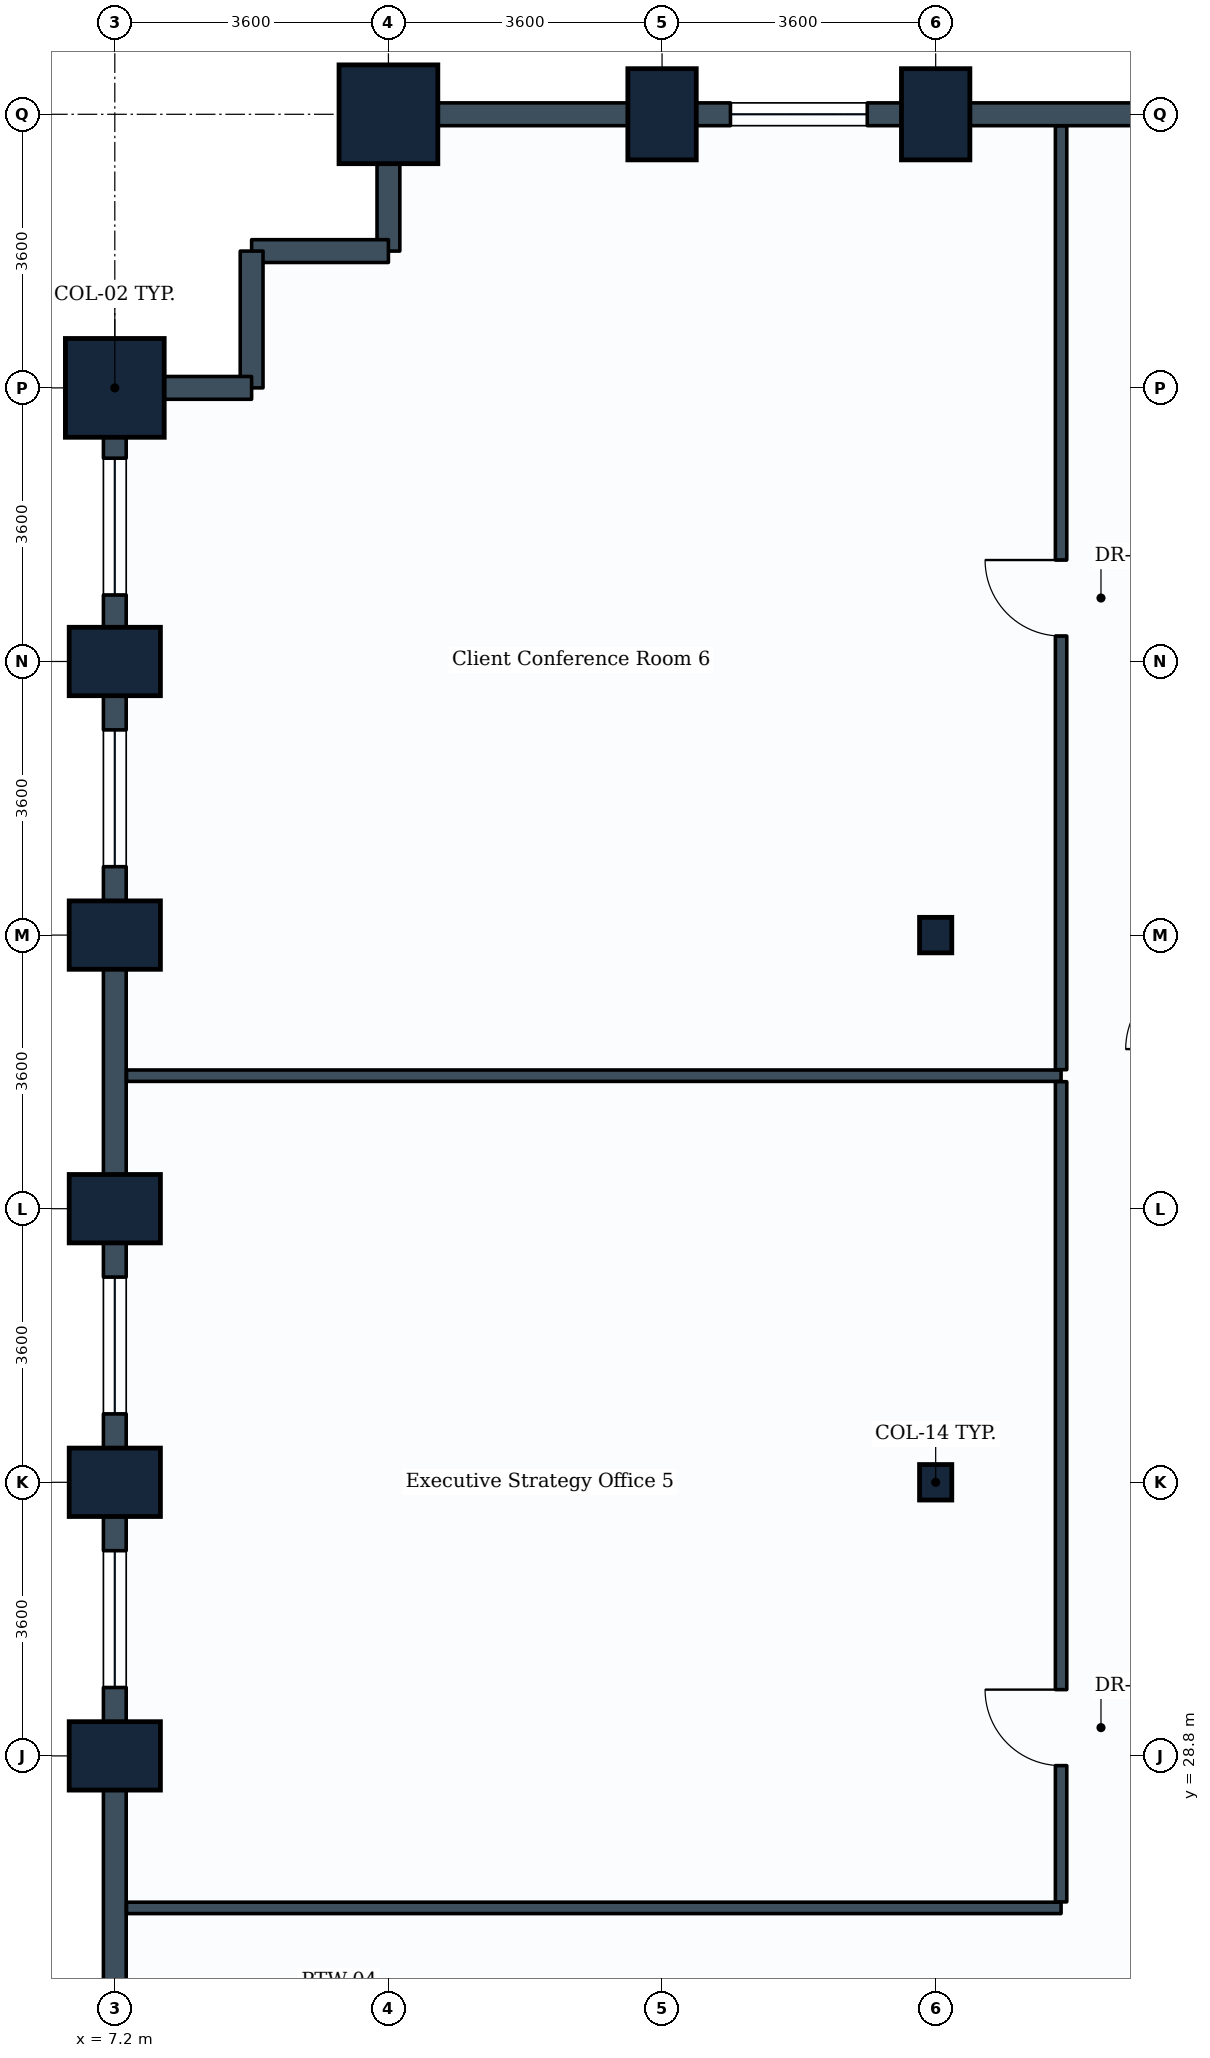
"""IFC4 building model, lengths in metres.
Left out: names, types, materials, properties, quantities, classifications, styles, units other than length and angle.
Written with IfcOpenShell. Run it as: python <this file> out.ifc"""

import sys

from ifc_helpers import new_model, si_unit, direction, frame, frame_2d, origin, origin_2d, place, context, subcontext, project, spatial, rectangle, i_section, extrude, element, fill, save


model = new_model("IFC4")
c1 = context("Model", 3, precision=1e-05, world=origin(), true_north=direction((0.0, 1.0)))
c2 = subcontext(c1, "Body", "Model", "MODEL_VIEW")
j1 = project(units=[si_unit("LENGTHUNIT", "METRE"), si_unit("PLANEANGLEUNIT", "RADIAN")], contexts=[c1])
p1 = place(None, origin())
s1 = spatial("IfcSite", under=j1, at=p1, CompositionType="ELEMENT")
p2 = place(p1, origin())
s2 = spatial("IfcBuilding", under=s1, at=p2, CompositionType="ELEMENT")
p3 = place(p2, frame((0.0, 0.0, 31.8)))
s3 = spatial("IfcBuildingStorey", under=s2, at=p3, CompositionType="ELEMENT", Elevation=31.8)
for number, where, z_axis, x_axis in (
    (1, (7.2, 28.8, 0.0), (0.0, 0.0, 1.0), (0.0, 1.0, 0.0)),
    (2, (7.2, 32.4, 0.0), (0.0, 0.0, 1.0), (0.0, 1.0, 0.0)),
    (3, (7.2, 36.0, 0.0), (0.0, 0.0, 1.0), (0.0, 1.0, 0.0)),
    (4, (7.2, 39.6, 0.0), (0.0, 0.0, 1.0), (0.0, 1.0, 0.0)),
    (5, (7.2, 43.2, 0.0), (0.0, 0.0, 1.0), (0.0, 1.0, 0.0)),
):
    element("IfcColumn", number, at=place(p3, frame(where, z_axis=z_axis, x_axis=x_axis)), inside=s3, PredefinedType="COLUMN", context=c2, shape_type="SweptSolid", body=[
        extrude(rectangle(XDim=0.9, YDim=1.2, at=origin_2d()), origin(), (0.0, 0.0, 1.0), 3.9),
    ])
for number, where, z_axis, x_axis in (
    (6, (7.2, 46.8, 0.0), (0.0, 0.0, 1.0), (0.0, 1.0, 0.0)),
    (7, (10.8, 50.4, 0.0), (0.0, 0.0, 1.0), (1.0, 0.0, 0.0)),
):
    element("IfcColumn", number, at=place(p3, frame(where, z_axis=z_axis, x_axis=x_axis)), inside=s3, PredefinedType="COLUMN", context=c2, shape_type="SweptSolid", body=[
        extrude(rectangle(XDim=1.3, YDim=1.3, at=origin_2d()), origin(), (0.0, 0.0, 1.0), 3.9),
    ])
p4 = place(p3, frame((14.4, 50.4, 0.0), z_axis=(0.0, 0.0, 1.0), x_axis=(1.0, 0.0, 0.0)))
e8 = element("IfcColumn", 8, at=p4, inside=s3, PredefinedType="COLUMN", context=c2, shape_type="SweptSolid", body=[
    extrude(rectangle(XDim=0.9, YDim=1.2, at=origin_2d()), origin(), (0.0, 0.0, 1.0), 3.9),
])
for number, where, z_axis, x_axis in (
    (9, (18.0, 32.4, 0.0), (0.0, 0.0, 1.0), (1.0, 0.0, 0.0)),
    (10, (18.0, 39.6, 0.0), (0.0, 0.0, 1.0), (1.0, 0.0, 0.0)),
):
    element("IfcColumn", number, at=place(p3, frame(where, z_axis=z_axis, x_axis=x_axis)), inside=s3, PredefinedType="COLUMN", context=c2, shape_type="SweptSolid", body=[
        extrude(i_section(OverallWidth=0.424, OverallDepth=0.467, WebThickness=0.033, FlangeThickness=0.053, FilletRadius=0.015, at=origin_2d()), origin(), (0.0, 0.0, 1.0), 3.9),
    ])
p5 = place(p3, frame((18.0, 50.4, 0.0), z_axis=(0.0, 0.0, 1.0), x_axis=(1.0, 0.0, 0.0)))
e11 = element("IfcColumn", 11, at=p5, inside=s3, PredefinedType="COLUMN", context=c2, shape_type="SweptSolid", body=[
    extrude(rectangle(XDim=0.9, YDim=1.2, at=origin_2d()), origin(), (0.0, 0.0, 1.0), 3.9),
])
p6 = place(p3, frame((18.0, 50.4, 0.0), z_axis=(0.0, 0.0, 1.0), x_axis=(1.0, 0.0, 0.0)))
e12 = element("IfcWall", 12, at=p6, inside=s3, PredefinedType="STANDARD", context=c2, shape_type="SweptSolid", body=[
    extrude(rectangle(XDim=3.6, YDim=0.3, at=frame_2d((1.8, 0.0))), origin(), (0.0, 0.0, 1.0), 2.93),
])
p7 = place(p3, frame((14.4, 50.4, 0.0), z_axis=(0.0, 0.0, 1.0), x_axis=(1.0, 0.0, 0.0)))
e13 = element("IfcWall", 13, at=p7, inside=s3, PredefinedType="STANDARD", context=c2, shape_type="SweptSolid", body=[
    extrude(rectangle(XDim=3.6, YDim=0.3, at=frame_2d((1.8, 0.0))), origin(), (0.0, 0.0, 1.0), 2.93),
])
p8 = place(p7, frame((0.9, 0.0, 0.85)))
e14 = element("IfcOpeningElement", 14, at=p8, cuts=e13, PredefinedType="OPENING", context=c2, shape_type="SweptSolid", body=[
    extrude(rectangle(XDim=1.8, YDim=1.35, at=frame_2d((0.9, 0.675))), frame((0.0, 0.16, 0.0), z_axis=(0.0, -1.0, 0.0), x_axis=(1.0, 0.0, 0.0)), (0.0, 0.0, 1.0), 0.32),
])
p9 = place(p3, frame((10.8, 50.4, 0.0), z_axis=(0.0, 0.0, 1.0), x_axis=(1.0, 0.0, 0.0)))
e15 = element("IfcWall", 15, at=p9, inside=s3, PredefinedType="STANDARD", context=c2, shape_type="SweptSolid", body=[
    extrude(rectangle(XDim=3.6, YDim=0.3, at=frame_2d((1.8, 0.0))), origin(), (0.0, 0.0, 1.0), 2.93),
])
p10 = place(p3, frame((10.8, 48.6, 0.0), z_axis=(0.0, 0.0, 1.0), x_axis=(0.0, 1.0, 0.0)))
e16 = element("IfcWall", 16, at=p10, inside=s3, PredefinedType="STANDARD", context=c2, shape_type="SweptSolid", body=[
    extrude(rectangle(XDim=1.8, YDim=0.3, at=frame_2d((0.9, 0.0))), origin(), (0.0, 0.0, 1.0), 2.93),
])
for number, where, z_axis, x_axis in (
    (17, (9.0, 48.6, 0.0), (0.0, 0.0, 1.0), (1.0, 0.0, 0.0)),
    (18, (9.0, 46.8, 0.0), (0.0, 0.0, 1.0), (0.0, 1.0, 0.0)),
):
    element("IfcWall", number, at=place(p3, frame(where, z_axis=z_axis, x_axis=x_axis)), inside=s3, PredefinedType="STANDARD", context=c2, shape_type="SweptSolid", body=[
        extrude(rectangle(XDim=1.8, YDim=0.3, at=frame_2d((0.9, 0.0))), origin(), (0.0, 0.0, 1.0), 3.635),
    ])
p11 = place(p3, frame((7.2, 46.8, 0.0), z_axis=(0.0, 0.0, 1.0), x_axis=(1.0, 0.0, 0.0)))
e19 = element("IfcWall", 19, at=p11, inside=s3, PredefinedType="STANDARD", context=c2, shape_type="SweptSolid", body=[
    extrude(rectangle(XDim=1.8, YDim=0.3, at=frame_2d((0.9, 0.0))), origin(), (0.0, 0.0, 1.0), 2.93),
])
p12 = place(p3, frame((7.2, 43.2, 0.0), z_axis=(0.0, 0.0, 1.0), x_axis=(0.0, 1.0, 0.0)))
e20 = element("IfcWall", 20, at=p12, inside=s3, PredefinedType="STANDARD", context=c2, shape_type="SweptSolid", body=[
    extrude(rectangle(XDim=3.6, YDim=0.3, at=frame_2d((1.8, 0.0))), origin(), (0.0, 0.0, 1.0), 2.93),
])
p13 = place(p12, frame((0.875, 0.0, 0.85)))
e21 = element("IfcOpeningElement", 21, at=p13, cuts=e20, PredefinedType="OPENING", context=c2, shape_type="SweptSolid", body=[
    extrude(rectangle(XDim=1.8, YDim=1.35, at=frame_2d((0.9, 0.675))), frame((0.0, 0.16, 0.0), z_axis=(0.0, -1.0, 0.0), x_axis=(1.0, 0.0, 0.0)), (0.0, 0.0, 1.0), 0.32),
])
p14 = place(p3, frame((7.2, 39.6, 0.0), z_axis=(0.0, 0.0, 1.0), x_axis=(0.0, 1.0, 0.0)))
e22 = element("IfcWall", 22, at=p14, inside=s3, PredefinedType="STANDARD", context=c2, shape_type="SweptSolid", body=[
    extrude(rectangle(XDim=3.6, YDim=0.3, at=frame_2d((1.8, 0.0))), origin(), (0.0, 0.0, 1.0), 2.93),
])
p15 = place(p14, frame((0.9, 0.0, 0.85)))
e23 = element("IfcOpeningElement", 23, at=p15, cuts=e22, PredefinedType="OPENING", context=c2, shape_type="SweptSolid", body=[
    extrude(rectangle(XDim=1.8, YDim=1.35, at=frame_2d((0.9, 0.675))), frame((0.0, 0.16, 0.0), z_axis=(0.0, -1.0, 0.0), x_axis=(1.0, 0.0, 0.0)), (0.0, 0.0, 1.0), 0.32),
])
p16 = place(p3, frame((7.2, 36.0, 0.0), z_axis=(0.0, 0.0, 1.0), x_axis=(0.0, 1.0, 0.0)))
e24 = element("IfcWall", 24, at=p16, inside=s3, PredefinedType="STANDARD", context=c2, shape_type="SweptSolid", body=[
    extrude(rectangle(XDim=3.6, YDim=0.3, at=frame_2d((1.8, 0.0))), origin(), (0.0, 0.0, 1.0), 2.93),
])
p17 = place(p3, frame((7.2, 32.4, 0.0), z_axis=(0.0, 0.0, 1.0), x_axis=(0.0, 1.0, 0.0)))
e25 = element("IfcWall", 25, at=p17, inside=s3, PredefinedType="STANDARD", context=c2, shape_type="SweptSolid", body=[
    extrude(rectangle(XDim=3.6, YDim=0.3, at=frame_2d((1.8, 0.0))), origin(), (0.0, 0.0, 1.0), 2.93),
])
p18 = place(p17, frame((0.9, 0.0, 0.85)))
e26 = element("IfcOpeningElement", 26, at=p18, cuts=e25, PredefinedType="OPENING", context=c2, shape_type="SweptSolid", body=[
    extrude(rectangle(XDim=1.8, YDim=1.35, at=frame_2d((0.9, 0.675))), frame((0.0, 0.16, 0.0), z_axis=(0.0, -1.0, 0.0), x_axis=(1.0, 0.0, 0.0)), (0.0, 0.0, 1.0), 0.32),
])
p19 = place(p3, frame((7.2, 28.8, 0.0), z_axis=(0.0, 0.0, 1.0), x_axis=(0.0, 1.0, 0.0)))
e27 = element("IfcWall", 27, at=p19, inside=s3, PredefinedType="STANDARD", context=c2, shape_type="SweptSolid", body=[
    extrude(rectangle(XDim=3.6, YDim=0.3, at=frame_2d((1.8, 0.0))), origin(), (0.0, 0.0, 1.0), 2.93),
])
p20 = place(p19, frame((0.9, 0.0, 0.85)))
e28 = element("IfcOpeningElement", 28, at=p20, cuts=e27, PredefinedType="OPENING", context=c2, shape_type="SweptSolid", body=[
    extrude(rectangle(XDim=1.8, YDim=1.35, at=frame_2d((0.9, 0.675))), frame((0.0, 0.16, 0.0), z_axis=(0.0, -1.0, 0.0), x_axis=(1.0, 0.0, 0.0)), (0.0, 0.0, 1.0), 0.32),
])
p21 = place(p3, frame((7.2, 25.2, 0.0), z_axis=(0.0, 0.0, 1.0), x_axis=(0.0, 1.0, 0.0)))
e29 = element("IfcWall", 29, at=p21, inside=s3, PredefinedType="STANDARD", context=c2, shape_type="SweptSolid", body=[
    extrude(rectangle(XDim=3.6, YDim=0.3, at=frame_2d((1.8, 0.0))), origin(), (0.0, 0.0, 1.0), 2.93),
])
for number, where, z_axis, x_axis in (
    (30, (7.354, 26.8, 0.0), (0.0, 0.0, 1.0), (1.0, 0.0, 0.0)),
    (31, (7.354, 37.75, 0.0), (0.0, 0.0, 1.0), (1.0, 0.0, 0.0)),
):
    element("IfcWall", number, at=place(p3, frame(where, z_axis=z_axis, x_axis=x_axis)), inside=s3, PredefinedType="PARTITIONING", context=c2, shape_type="SweptSolid", body=[
        extrude(rectangle(XDim=12.296, YDim=0.15, at=frame_2d((6.148, 0.0))), origin(), (0.0, 0.0, 1.0), 2.93),
    ])
p22 = place(p3, frame((19.65, 26.879, 0.0), z_axis=(0.0, 0.0, 1.0), x_axis=(0.0, 1.0, 0.0)))
e32 = element("IfcWall", 32, at=p22, inside=s3, PredefinedType="PARTITIONING", context=c2, shape_type="SweptSolid", body=[
    extrude(rectangle(XDim=10.792, YDim=0.15, at=frame_2d((5.396, 0.0))), origin(), (0.0, 0.0, 1.0), 3.08),
])
p23 = place(p22, frame((1.793, 0.0, 0.0)))
e33 = element("IfcOpeningElement", 33, at=p23, cuts=e32, PredefinedType="OPENING", context=c2, shape_type="SweptSolid", body=[
    extrude(rectangle(XDim=1.0, YDim=2.1, at=frame_2d((0.5, 1.05))), frame((0.0, 0.085, 0.0), z_axis=(0.0, -1.0, 0.0), x_axis=(1.0, 0.0, 0.0)), (0.0, 0.0, 1.0), 0.17),
])
p24 = place(p3, frame((19.65, 37.829, 0.0), z_axis=(0.0, 0.0, 1.0), x_axis=(0.0, 1.0, 0.0)))
e34 = element("IfcWall", 34, at=p24, inside=s3, PredefinedType="PARTITIONING", context=c2, shape_type="SweptSolid", body=[
    extrude(rectangle(XDim=12.417, YDim=0.15, at=frame_2d((6.208, 0.0))), origin(), (0.0, 0.0, 1.0), 2.93),
])
p25 = place(p24, frame((5.706, 0.0, 0.0)))
e35 = element("IfcOpeningElement", 35, at=p25, cuts=e34, PredefinedType="OPENING", context=c2, shape_type="SweptSolid", body=[
    extrude(rectangle(XDim=1.0, YDim=2.1, at=frame_2d((0.5, 1.05))), frame((0.0, 0.085, 0.0), z_axis=(0.0, -1.0, 0.0), x_axis=(1.0, 0.0, 0.0)), (0.0, 0.0, 1.0), 0.17),
])
p26 = place(p8, origin())
e36 = element("IfcWindow", 36, at=p26, inside=s3, PartitioningType="SINGLE_PANEL", PredefinedType="WINDOW", context=c2, shape_type="SweptSolid", body=[
    extrude(rectangle(XDim=1.8, YDim=1.35, at=frame_2d((0.9, 0.675))), frame((0.0, 0.03, 0.0), z_axis=(0.0, -1.0, 0.0), x_axis=(1.0, 0.0, 0.0)), (0.0, 0.0, 1.0), 0.06),
])
fill(e14, e36)
p27 = place(p13, origin())
e37 = element("IfcWindow", 37, at=p27, inside=s3, PartitioningType="SINGLE_PANEL", PredefinedType="WINDOW", context=c2, shape_type="SweptSolid", body=[
    extrude(rectangle(XDim=1.8, YDim=1.35, at=frame_2d((0.9, 0.675))), frame((0.0, 0.03, 0.0), z_axis=(0.0, -1.0, 0.0), x_axis=(1.0, 0.0, 0.0)), (0.0, 0.0, 1.0), 0.06),
])
fill(e21, e37)
p28 = place(p15, origin())
e38 = element("IfcWindow", 38, at=p28, inside=s3, PartitioningType="SINGLE_PANEL", PredefinedType="WINDOW", context=c2, shape_type="SweptSolid", body=[
    extrude(rectangle(XDim=1.8, YDim=1.35, at=frame_2d((0.9, 0.675))), frame((0.0, 0.03, 0.0), z_axis=(0.0, -1.0, 0.0), x_axis=(1.0, 0.0, 0.0)), (0.0, 0.0, 1.0), 0.06),
])
fill(e23, e38)
p29 = place(p18, origin())
e39 = element("IfcWindow", 39, at=p29, inside=s3, PartitioningType="SINGLE_PANEL", PredefinedType="WINDOW", context=c2, shape_type="SweptSolid", body=[
    extrude(rectangle(XDim=1.8, YDim=1.35, at=frame_2d((0.9, 0.675))), frame((0.0, 0.03, 0.0), z_axis=(0.0, -1.0, 0.0), x_axis=(1.0, 0.0, 0.0)), (0.0, 0.0, 1.0), 0.06),
])
fill(e26, e39)
p30 = place(p20, origin())
e40 = element("IfcWindow", 40, at=p30, inside=s3, PartitioningType="SINGLE_PANEL", PredefinedType="WINDOW", context=c2, shape_type="SweptSolid", body=[
    extrude(rectangle(XDim=1.8, YDim=1.35, at=frame_2d((0.9, 0.675))), frame((0.0, 0.03, 0.0), z_axis=(0.0, -1.0, 0.0), x_axis=(1.0, 0.0, 0.0)), (0.0, 0.0, 1.0), 0.06),
])
fill(e28, e40)
p31 = place(p23, origin())
e41 = element("IfcDoor", 41, at=p31, inside=s3, OperationType="SINGLE_SWING_RIGHT", PredefinedType="DOOR", context=c2, shape_type="SweptSolid", body=[
    extrude(rectangle(XDim=1.0, YDim=2.1, at=frame_2d((0.5, 1.05))), frame((0.0, 0.025, 0.0), z_axis=(0.0, -1.0, 0.0), x_axis=(1.0, 0.0, 0.0)), (0.0, 0.0, 1.0), 0.05),
])
fill(e33, e41)
p32 = place(p25, origin())
e42 = element("IfcDoor", 42, at=p32, inside=s3, OperationType="SINGLE_SWING_RIGHT", PredefinedType="DOOR", context=c2, shape_type="SweptSolid", body=[
    extrude(rectangle(XDim=1.0, YDim=2.1, at=frame_2d((0.5, 1.05))), frame((0.0, 0.025, 0.0), z_axis=(0.0, -1.0, 0.0), x_axis=(1.0, 0.0, 0.0)), (0.0, 0.0, 1.0), 0.05),
])
fill(e35, e42)
save(model, sys.argv[1])
